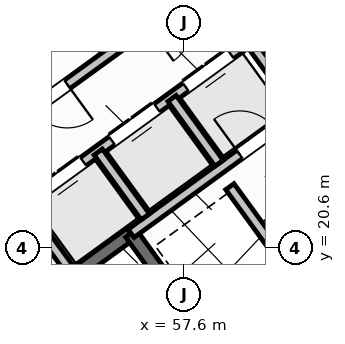
"""IFC4 building model, lengths in metres.
Left out: names, types, materials, properties, quantities, classifications, styles, units other than length and angle.
Written with IfcOpenShell. Run it as: python <this file> out.ifc"""

import sys

from ifc_helpers import new_model, si_unit, direction, frame, frame_2d, origin, place, context, subcontext, project, spatial, rectangle, extrude, source, transform, mapped, element, fill, save


model = new_model("IFC4")
c1 = context("Model", 3, precision=1e-05, world=origin(), true_north=direction((0.0, 1.0)))
c2 = subcontext(c1, "Body", "Model", "MODEL_VIEW")
j1 = project(units=[si_unit("LENGTHUNIT", "METRE"), si_unit("PLANEANGLEUNIT", "RADIAN")], contexts=[c1])
p1 = place(None, origin())
s1 = spatial("IfcSite", under=j1, at=p1, CompositionType="ELEMENT")
p2 = place(p1, origin())
s2 = spatial("IfcBuilding", under=s1, at=p2, CompositionType="ELEMENT")
p3 = place(p2, frame((0.0, 0.0, 24.0)))
s3 = spatial("IfcBuildingStorey", under=s2, at=p3, CompositionType="ELEMENT", Elevation=24.0)
p4 = place(p3, frame((52.318, 13.11, 0.0), z_axis=(0.0, 0.0, 1.0), x_axis=(0.809019445368, 0.587781878776, 0.0)))
e1 = element("IfcWall", 1, at=p4, inside=s3, PredefinedType="SHEAR", context=c2, shape_type="SweptSolid", body=[
    extrude(rectangle(XDim=12.44, YDim=0.65, at=frame_2d((6.22, 0.0))), origin(), (0.0, 0.0, 1.0), 3.35),
])
p5 = place(p3, frame((70.18, 20.52, 0.0), z_axis=(0.0, 0.0, 1.0), x_axis=(-0.587784691012, 0.809017402169, 0.0)))
e2 = element("IfcWall", 2, at=p5, inside=s3, PredefinedType="PARAPET", context=c2, shape_type="SweptSolid", body=[
    extrude(rectangle(XDim=18.608, YDim=0.24, at=frame_2d((9.304, 0.0))), origin(), (0.0, 0.0, 1.0), 1.15),
])
p6 = place(p3, frame((58.455, 35.484, 0.0), z_axis=(0.0, 0.0, 1.0), x_axis=(0.587783625747, -0.809018176127, 0.0)))
e3 = element("IfcWall", 3, at=p6, inside=s3, PredefinedType="STANDARD", context=c2, shape_type="SweptSolid", body=[
    extrude(rectangle(XDim=21.587, YDim=0.32, at=frame_2d((10.794, 0.0))), origin(), (0.0, 0.0, 1.0), 2.725),
])
p7 = place(p6, frame((2.994, 0.0, 0.8)))
e4 = element("IfcOpeningElement", 4, at=p7, cuts=e3, PredefinedType="OPENING", context=c2, shape_type="SweptSolid", body=[
    extrude(rectangle(XDim=2.1, YDim=1.55, at=frame_2d((1.05, 0.775))), frame((0.0, 0.17, 0.0), z_axis=(0.0, -1.0, 0.0), x_axis=(1.0, 0.0, 0.0)), (0.0, 0.0, 1.0), 0.34),
])
p8 = place(p6, frame((11.934, 0.0, 0.85)))
e5 = element("IfcOpeningElement", 5, at=p8, cuts=e3, PredefinedType="OPENING", context=c2, shape_type="SweptSolid", body=[
    extrude(rectangle(XDim=1.8, YDim=1.5, at=frame_2d((0.9, 0.75))), frame((0.0, 0.17, 0.0), z_axis=(0.0, -1.0, 0.0), x_axis=(1.0, 0.0, 0.0)), (0.0, 0.0, 1.0), 0.34),
])
p9 = place(p3, frame((49.863, 23.44, 0.0), z_axis=(0.0, 0.0, 1.0), x_axis=(0.809003474932, 0.587803859759, 0.0)))
e6 = element("IfcWall", 6, at=p9, inside=s3, PredefinedType="SHEAR", context=c2, shape_type="SweptSolid", body=[
    extrude(rectangle(XDim=7.46, YDim=0.26, at=frame_2d((3.73, 0.0))), origin(), (0.0, 0.0, 1.0), 3.35),
])
p10 = place(p9, frame((0.36, 0.0, 0.0)))
e7 = element("IfcOpeningElement", 7, at=p10, cuts=e6, PredefinedType="OPENING", context=c2, shape_type="SweptSolid", body=[
    extrude(rectangle(XDim=0.86, YDim=2.05, at=frame_2d((0.43, 1.025))), frame((0.0, 0.14, 0.0), z_axis=(0.0, -1.0, 0.0), x_axis=(1.0, 0.0, 0.0)), (0.0, 0.0, 1.0), 0.28),
])
p11 = place(p3, frame((50.615, 16.57, 0.0), z_axis=(0.0, 0.0, 1.0), x_axis=(0.809028366311, 0.587769599847, 0.0)))
e8 = element("IfcWall", 8, at=p11, inside=s3, PredefinedType="SHEAR", context=c2, shape_type="SweptSolid", body=[
    extrude(rectangle(XDim=7.33, YDim=0.26, at=frame_2d((3.665, 0.0))), origin(), (0.0, 0.0, 1.0), 3.35),
])
p12 = place(p11, frame((0.22, 0.0, 0.0)))
e9 = element("IfcOpeningElement", 9, at=p12, cuts=e8, PredefinedType="OPENING", context=c2, shape_type="SweptSolid", body=[
    extrude(rectangle(XDim=1.1, YDim=2.1, at=frame_2d((0.55, 1.05))), frame((0.0, 0.14, 0.0), z_axis=(0.0, -1.0, 0.0), x_axis=(1.0, 0.0, 0.0)), (0.0, 0.0, 1.0), 0.28),
])
p13 = place(p3, frame((58.41, 18.327, 0.0), z_axis=(0.0, 0.0, 1.0), x_axis=(-0.58776738483, 0.809029975545, 0.0)))
e10 = element("IfcWall", 10, at=p13, inside=s3, PredefinedType="SHEAR", context=c2, shape_type="SweptSolid", body=[
    extrude(rectangle(XDim=3.16, YDim=0.26, at=frame_2d((1.58, 0.0))), origin(), (0.0, 0.0, 1.0), 3.35),
])
p14 = place(p3, frame((56.553, 20.884, 0.0), z_axis=(0.0, 0.0, 1.0), x_axis=(0.809035789462, 0.587759382205, 0.0)))
e11 = element("IfcWall", 11, at=p14, inside=s3, PredefinedType="STANDARD", context=c2, shape_type="SweptSolid", body=[
    extrude(rectangle(XDim=3.768, YDim=0.2, at=frame_2d((1.884, 0.0))), origin(), (0.0, 0.0, 1.0), 3.34),
])
p15 = place(p14, frame((2.65, 0.0, 0.0)))
e12 = element("IfcOpeningElement", 12, at=p15, cuts=e11, PredefinedType="OPENING", context=c2, shape_type="SweptSolid", body=[
    extrude(rectangle(XDim=0.86, YDim=2.05, at=frame_2d((0.43, 1.025))), frame((0.0, 0.11, 0.0), z_axis=(0.0, -1.0, 0.0), x_axis=(1.0, 0.0, 0.0)), (0.0, 0.0, 1.0), 0.22),
])
p16 = place(p3, frame((54.421, 21.436, 0.0), z_axis=(0.0, 0.0, 1.0), x_axis=(0.809013710463, 0.587789772183, 0.0)))
e13 = element("IfcWall", 13, at=p16, inside=s3, PredefinedType="STANDARD", context=c2, shape_type="SweptSolid", body=[
    extrude(rectangle(XDim=5.36, YDim=0.2, at=frame_2d((2.68, 0.0))), origin(), (0.0, 0.0, 1.0), 3.34),
])
p17 = place(p16, frame((0.37, 0.0, 0.0)))
e14 = element("IfcOpeningElement", 14, at=p17, cuts=e13, PredefinedType="OPENING", context=c2, shape_type="SweptSolid", body=[
    extrude(rectangle(XDim=1.1, YDim=2.15, at=frame_2d((0.55, 1.075))), frame((0.0, 0.11, 0.0), z_axis=(0.0, -1.0, 0.0), x_axis=(1.0, 0.0, 0.0)), (0.0, 0.0, 1.0), 0.22),
])
p18 = place(p16, frame((2.17, 0.0, 0.0)))
e15 = element("IfcOpeningElement", 15, at=p18, cuts=e13, PredefinedType="OPENING", context=c2, shape_type="SweptSolid", body=[
    extrude(rectangle(XDim=1.1, YDim=2.15, at=frame_2d((0.55, 1.075))), frame((0.0, 0.11, 0.0), z_axis=(0.0, -1.0, 0.0), x_axis=(1.0, 0.0, 0.0)), (0.0, 0.0, 1.0), 0.22),
])
p19 = place(p16, frame((3.97, 0.0, 0.0)))
e16 = element("IfcOpeningElement", 16, at=p19, cuts=e13, PredefinedType="OPENING", context=c2, shape_type="SweptSolid", body=[
    extrude(rectangle(XDim=1.1, YDim=2.15, at=frame_2d((0.55, 1.075))), frame((0.0, 0.11, 0.0), z_axis=(0.0, -1.0, 0.0), x_axis=(1.0, 0.0, 0.0)), (0.0, 0.0, 1.0), 0.22),
])
p20 = place(p3, frame((55.391, 20.102, 0.0), z_axis=(0.0, 0.0, 1.0), x_axis=(-0.58778447739, 0.809017557374, 0.0)))
e17 = element("IfcWall", 17, at=p20, inside=s3, PredefinedType="STANDARD", context=c2, shape_type="SweptSolid", body=[
    extrude(rectangle(XDim=1.65, YDim=0.2, at=frame_2d((0.825, 0.0))), origin(), (0.0, 0.0, 1.0), 3.34),
])
p21 = place(p3, frame((56.834, 21.212, 0.0), z_axis=(0.0, 0.0, 1.0), x_axis=(-0.58776738483, 0.809029975545, 0.0)))
e18 = element("IfcWall", 18, at=p21, inside=s3, PredefinedType="STANDARD", context=c2, shape_type="SweptSolid", body=[
    extrude(rectangle(XDim=1.58, YDim=0.2, at=frame_2d((0.79, 0.0))), origin(), (0.0, 0.0, 1.0), 3.34),
])
p22 = place(p3, frame((58.29, 22.27, 0.0), z_axis=(0.0, 0.0, 1.0), x_axis=(-0.587840865826, 0.808976585857, 0.0)))
e19 = element("IfcWall", 19, at=p22, inside=s3, PredefinedType="STANDARD", context=c2, shape_type="SweptSolid", body=[
    extrude(rectangle(XDim=1.58, YDim=0.2, at=frame_2d((0.79, 0.0))), origin(), (0.0, 0.0, 1.0), 3.34),
])
p23 = place(p3, frame((60.067, 19.655, 0.0), z_axis=(0.0, 0.0, 1.0), x_axis=(-0.587800520745, 0.809005900975, 0.0)))
e20 = element("IfcWall", 20, at=p23, inside=s3, PredefinedType="STANDARD", context=c2, shape_type="SweptSolid", body=[
    extrude(rectangle(XDim=2.66, YDim=0.2, at=frame_2d((1.33, 0.0))), origin(), (0.0, 0.0, 1.0), 3.34),
])
p24 = place(p3, frame((58.472, 18.447, 0.0), z_axis=(0.0, 0.0, 1.0), x_axis=(0.809022487728, 0.587777691266, 0.0)))
e21 = element("IfcWall", 21, at=p24, inside=s3, PredefinedType="STANDARD", context=c2, shape_type="SweptSolid", body=[
    extrude(rectangle(XDim=3.648, YDim=0.2, at=frame_2d((1.824, 0.0))), origin(), (0.0, 0.0, 1.0), 3.34),
])
p25 = place(p3, frame((56.111, 24.419, 0.0), z_axis=(0.0, 0.0, 1.0), x_axis=(-0.58777848983, 0.809021907548, 0.0)))
e22 = element("IfcWall", 22, at=p25, inside=s3, PredefinedType="STANDARD", context=c2, shape_type="SweptSolid", body=[
    extrude(rectangle(XDim=2.88, YDim=0.2, at=frame_2d((1.44, 0.0))), origin(), (0.0, 0.0, 1.0), 3.34),
])
p26 = place(p3, frame((53.425, 22.468, 0.0), z_axis=(0.0, 0.0, 1.0), x_axis=(0.80902705128, 0.587771409902, 0.0)))
e23 = element("IfcWall", 23, at=p26, inside=s3, PredefinedType="STANDARD", context=c2, shape_type="SweptSolid", body=[
    extrude(rectangle(XDim=5.368, YDim=0.2, at=frame_2d((2.684, 0.0))), origin(), (0.0, 0.0, 1.0), 3.34),
])
p27 = place(p26, frame((4.28, 0.0, 0.0)))
e24 = element("IfcOpeningElement", 24, at=p27, cuts=e23, PredefinedType="OPENING", context=c2, shape_type="SweptSolid", body=[
    extrude(rectangle(XDim=0.86, YDim=2.05, at=frame_2d((0.43, 1.025))), frame((0.0, 0.11, 0.0), z_axis=(0.0, -1.0, 0.0), x_axis=(1.0, 0.0, 0.0)), (0.0, 0.0, 1.0), 0.22),
])
p28 = place(p26, frame((1.45, 0.0, 0.0)))
e25 = element("IfcOpeningElement", 25, at=p28, cuts=e23, PredefinedType="OPENING", context=c2, shape_type="SweptSolid", body=[
    extrude(rectangle(XDim=0.86, YDim=2.05, at=frame_2d((0.43, 1.025))), frame((0.0, 0.11, 0.0), z_axis=(0.0, -1.0, 0.0), x_axis=(1.0, 0.0, 0.0)), (0.0, 0.0, 1.0), 0.22),
])
p29 = place(p3, frame((52.618, 23.612, 0.0), z_axis=(0.0, 0.0, 1.0), x_axis=(0.809009587469, 0.587795446889, 0.0)))
e26 = element("IfcWall", 26, at=p29, inside=s3, PredefinedType="PLUMBINGWALL", context=c2, shape_type="SweptSolid", body=[
    extrude(rectangle(XDim=3.28, YDim=0.14, at=frame_2d((1.64, 0.0))), origin(), (0.0, 0.0, 1.0), 3.34),
])
p30 = place(p29, frame((1.2, 0.0, 0.0)))
e27 = element("IfcOpeningElement", 27, at=p30, cuts=e26, PredefinedType="OPENING", context=c2, shape_type="SweptSolid", body=[
    extrude(rectangle(XDim=0.78, YDim=2.05, at=frame_2d((0.39, 1.025))), frame((0.0, 0.08, 0.0), z_axis=(0.0, -1.0, 0.0), x_axis=(1.0, 0.0, 0.0)), (0.0, 0.0, 1.0), 0.16),
])
p31 = place(p3, frame((59.827, 23.386, 0.0), z_axis=(0.0, 0.0, 1.0), x_axis=(-0.587803840107, 0.809003489211, 0.0)))
e28 = element("IfcWall", 28, at=p31, inside=s3, PredefinedType="STANDARD", context=c2, shape_type="SweptSolid", body=[
    extrude(rectangle(XDim=2.96, YDim=0.2, at=frame_2d((1.48, 0.0))), origin(), (0.0, 0.0, 1.0), 3.34),
])
p32 = place(p31, frame((1.68, 0.0, 0.0)))
e29 = element("IfcOpeningElement", 29, at=p32, cuts=e28, PredefinedType="OPENING", context=c2, shape_type="SweptSolid", body=[
    extrude(rectangle(XDim=1.0, YDim=2.1, at=frame_2d((0.5, 1.05))), frame((0.0, 0.11, 0.0), z_axis=(0.0, -1.0, 0.0), x_axis=(1.0, 0.0, 0.0)), (0.0, 0.0, 1.0), 0.22),
])
m1 = source(origin(), c2, "Body", "SweptSolid", [
    extrude(rectangle(XDim=1.1, YDim=2.15, at=frame_2d((0.55, 1.075))), frame((0.0, 0.025, 0.0), z_axis=(0.0, -1.0, 0.0), x_axis=(1.0, 0.0, 0.0)), (0.0, 0.0, 1.0), 0.05),
])
p33 = place(p17, origin())
e30 = element("IfcDoor", 30, at=p33, inside=s3, OperationType="DOUBLE_DOOR_SLIDING", PredefinedType="DOOR", context=c2, shape_type="MappedRepresentation", body=[
    mapped(m1, transform((0.0, 0.0, 0.0), scale=1.0)),
])
fill(e14, e30)
p34 = place(p18, origin())
e31 = element("IfcDoor", 31, at=p34, inside=s3, OperationType="DOUBLE_DOOR_SLIDING", PredefinedType="DOOR", context=c2, shape_type="MappedRepresentation", body=[
    mapped(m1, transform((0.0, 0.0, 0.0), scale=1.0)),
])
fill(e15, e31)
p35 = place(p19, origin())
e32 = element("IfcDoor", 32, at=p35, inside=s3, OperationType="DOUBLE_DOOR_SLIDING", PredefinedType="DOOR", context=c2, shape_type="MappedRepresentation", body=[
    mapped(m1, transform((0.0, 0.0, 0.0), scale=1.0)),
])
fill(e16, e32)
m2 = source(origin(), c2, "Body", "SweptSolid", [
    extrude(rectangle(XDim=0.86, YDim=2.05, at=frame_2d((0.43, 1.025))), frame((0.0, 0.025, 0.0), z_axis=(0.0, -1.0, 0.0), x_axis=(1.0, 0.0, 0.0)), (0.0, 0.0, 1.0), 0.05),
])
p36 = place(p15, origin())
e33 = element("IfcDoor", 33, at=p36, inside=s3, OperationType="SINGLE_SWING_LEFT", PredefinedType="DOOR", context=c2, shape_type="MappedRepresentation", body=[
    mapped(m2, transform((0.0, 0.0, 0.0), scale=1.0)),
])
fill(e12, e33)
p37 = place(p28, frame((0.86, 0.0, 0.0), z_axis=(0.0, 0.0, 1.0), x_axis=(-1.0, 0.0, 0.0)))
e34 = element("IfcDoor", 34, at=p37, inside=s3, OperationType="SINGLE_SWING_LEFT", PredefinedType="DOOR", context=c2, shape_type="MappedRepresentation", body=[
    mapped(m2, transform((0.0, 0.0, 0.0), scale=1.0)),
])
fill(e25, e34)
save(model, sys.argv[1])
